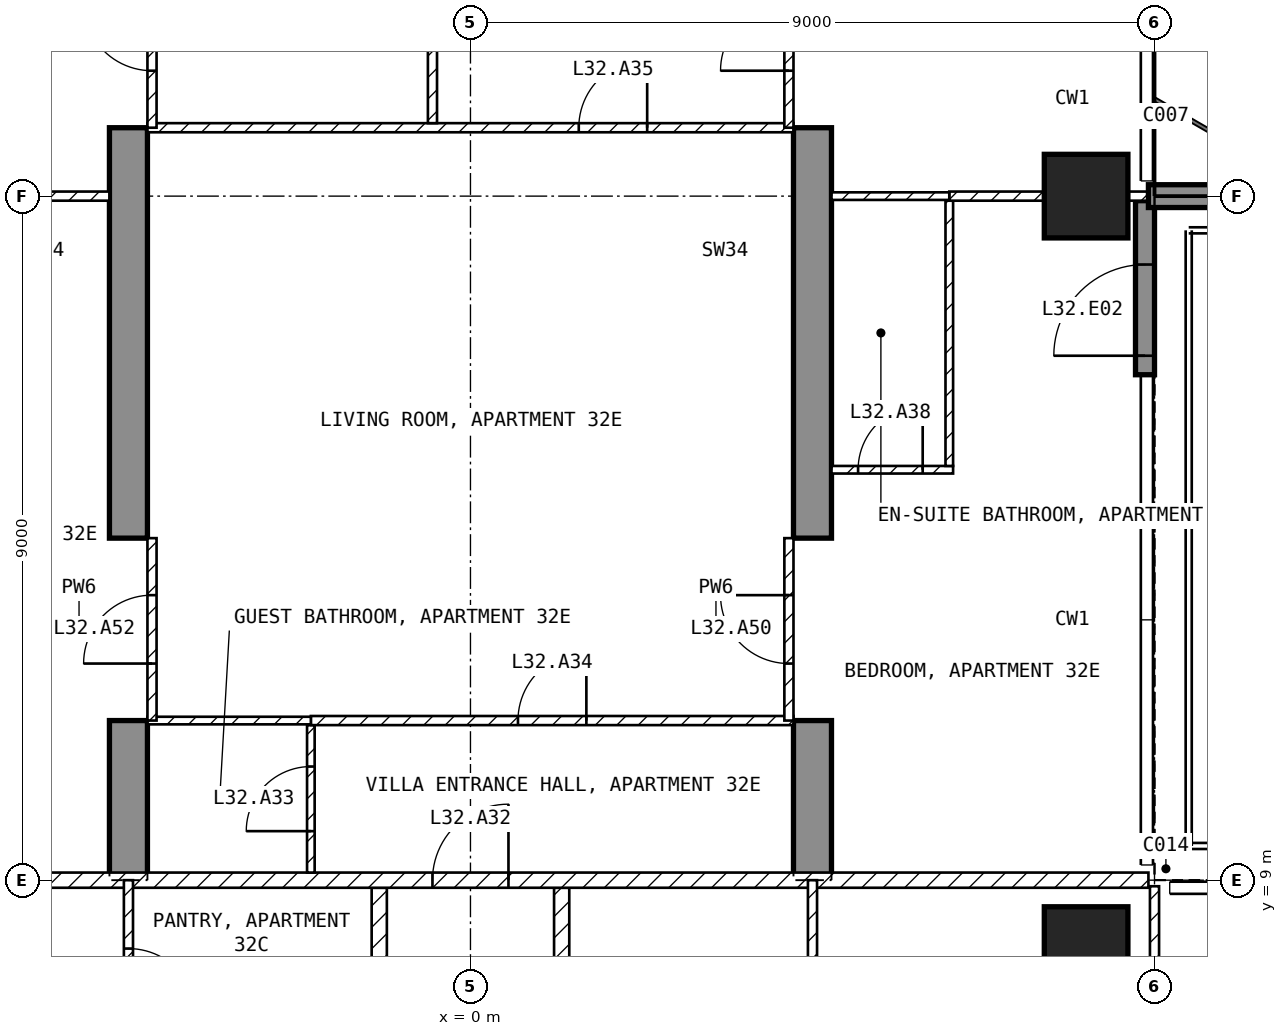
"""IFC4 building model, lengths in metres.
Left out: names, types, materials, properties, quantities, classifications, styles, units other than length and angle.
Written with IfcOpenShell. Run it as: python <this file> out.ifc"""

import sys

from ifc_helpers import new_model, si_unit, direction, frame, frame_2d, origin, origin_2d, place, context, subcontext, project, spatial, polyline, rectangle, outline, extrude, element, fill, save


model = new_model("IFC4")
c1 = context("Model", 3, precision=1e-05, world=origin(), true_north=direction((0.0, 1.0)))
c2 = subcontext(c1, "Body", "Model", "MODEL_VIEW")
j1 = project(units=[si_unit("LENGTHUNIT", "METRE"), si_unit("PLANEANGLEUNIT", "RADIAN")], contexts=[c1])
p1 = place(None, origin())
s1 = spatial("IfcSite", under=j1, at=p1, CompositionType="ELEMENT")
p2 = place(p1, origin())
s2 = spatial("IfcBuilding", under=s1, at=p2, CompositionType="ELEMENT")
p3 = place(p2, frame((0.0, 0.0, 133.9)))
s3 = spatial("IfcBuildingStorey", under=s2, at=p3, CompositionType="ELEMENT", Elevation=133.9)
for number, where, z_axis, x_axis in (
    (1, (8.1, 8.1, -0.25), (0.0, 0.0, 1.0), (1.0, 0.0, 0.0)),
    (2, (8.1, 18.0, -0.25), (0.0, 0.0, 1.0), (1.0, 0.0, 0.0)),
):
    element("IfcColumn", number, at=place(p3, frame(where, z_axis=z_axis, x_axis=x_axis)), inside=s3, PredefinedType="COLUMN", context=c2, shape_type="SweptSolid", body=[
        extrude(rectangle(XDim=1.1, YDim=1.1, at=origin_2d()), origin(), (0.0, 0.0, 1.0), 3.5),
    ])
for number, where, z_axis, x_axis in (
    (3, (-4.75, 9.0, -0.25), (1.0, 0.0, 0.0), (0.0, 1.0, 0.0)),
    (4, (4.25, 9.0, -0.25), (1.0, 0.0, 0.0), (0.0, 1.0, 0.0)),
):
    element("IfcWall", number, at=place(p3, frame(where, z_axis=z_axis, x_axis=x_axis)), inside=s3, PredefinedType="SHEAR", context=c2, shape_type="SweptSolid", body=[
        extrude(outline(polyline([(0.0, 0.0), (2.1, 0.0), (2.1, 2.65), (4.5, 2.65), (4.5, 0.0), (9.9, 0.0), (9.9, 2.65), (12.3, 2.65), (12.3, 0.0), (16.55, 0.0), (16.55, 3.5), (0.0, 3.5), (0.0, 0.0)])), origin(), (0.0, 0.0, 1.0), 0.5),
    ])
p4 = place(p3, frame((8.875, 15.65, 0.0), z_axis=(0.0, 0.0, 1.0), x_axis=(0.0, 1.0, 0.0)))
e5 = element("IfcWall", 5, at=p4, inside=s3, PredefinedType="SOLIDWALL", context=c2, shape_type="SweptSolid", body=[
    extrude(rectangle(XDim=2.29, YDim=0.25, at=frame_2d((1.145, 0.0))), origin(), (0.0, 0.0, 1.0), 3.25),
])
p5 = place(p4, frame((0.25, 0.0, 0.0)))
e6 = element("IfcOpeningElement", 6, at=p5, cuts=e5, PredefinedType="OPENING", context=c2, shape_type="SweptSolid", body=[
    extrude(rectangle(XDim=1.2, YDim=2.4, at=frame_2d((0.6, 1.2))), frame((0.0, 0.135, 0.0), z_axis=(0.0, -1.0, 0.0), x_axis=(1.0, 0.0, 0.0)), (0.0, 0.0, 1.0), 0.27),
])
p6 = place(p3, frame((8.92, 18.0, 0.0), z_axis=(0.0, 0.0, 1.0), x_axis=(1.0, 0.0, 0.0)))
e7 = element("IfcWall", 7, at=p6, inside=s3, PredefinedType="SOLIDWALL", context=c2, shape_type="SweptSolid", body=[
    extrude(rectangle(XDim=2.82, YDim=0.3, at=frame_2d((1.41, 0.0))), origin(), (0.0, 0.0, 1.0), 3.25),
])
for number, where, z_axis, x_axis in (
    (8, (1.2, 8.9, 0.0), (0.0, 0.0, 1.0), (0.0, -1.0, 0.0)),
    (9, (-1.2, 4.6, 0.0), (0.0, 0.0, 1.0), (0.0, 1.0, 0.0)),
):
    element("IfcWall", number, at=place(p3, frame(where, z_axis=z_axis, x_axis=x_axis)), inside=s3, PredefinedType="PARTITIONING", context=c2, shape_type="SweptSolid", body=[
        extrude(rectangle(XDim=4.3, YDim=0.2, at=frame_2d((2.15, 0.0))), origin(), (0.0, 0.0, 1.0), 3.25),
    ])
p7 = place(p3, frame((-8.92, 9.0, 0.0), z_axis=(0.0, 0.0, 1.0), x_axis=(1.0, 0.0, 0.0)))
e10 = element("IfcWall", 10, at=p7, inside=s3, PredefinedType="PARTITIONING", context=c2, shape_type="SweptSolid", body=[
    extrude(rectangle(XDim=17.84, YDim=0.2, at=frame_2d((8.92, 0.0))), origin(), (0.0, 0.0, 1.0), 3.25),
])
p8 = place(p7, frame((8.42, 0.0, 0.0)))
e11 = element("IfcOpeningElement", 11, at=p8, cuts=e10, PredefinedType="OPENING", context=c2, shape_type="SweptSolid", body=[
    extrude(rectangle(XDim=1.0, YDim=2.1, at=frame_2d((0.5, 1.05))), frame((0.0, 0.11, 0.0), z_axis=(0.0, -1.0, 0.0), x_axis=(1.0, 0.0, 0.0)), (0.0, 0.0, 1.0), 0.22),
])
p9 = place(p3, frame((9.0, 1.3, 0.0), z_axis=(0.0, 0.0, 1.0), x_axis=(0.0, 1.0, 0.0)))
e12 = element("IfcWall", 12, at=p9, inside=s3, PredefinedType="PARTITIONING", context=c2, shape_type="SweptSolid", body=[
    extrude(rectangle(XDim=7.62, YDim=0.12, at=frame_2d((3.81, 0.0))), origin(), (0.0, 0.0, 1.0), 3.25),
])
p10 = place(p9, frame((4.1, 0.0, 0.0)))
e13 = element("IfcOpeningElement", 13, at=p10, cuts=e12, PredefinedType="OPENING", context=c2, shape_type="SweptSolid", body=[
    extrude(rectangle(XDim=0.9, YDim=2.1, at=frame_2d((0.45, 1.05))), frame((0.0, 0.07, 0.0), z_axis=(0.0, -1.0, 0.0), x_axis=(1.0, 0.0, 0.0)), (0.0, 0.0, 1.0), 0.14),
])
p11 = place(p3, frame((4.5, 4.5, 0.0), z_axis=(0.0, 0.0, 1.0), x_axis=(0.0, 1.0, 0.0)))
e14 = element("IfcWall", 14, at=p11, inside=s3, PredefinedType="PARTITIONING", context=c2, shape_type="SweptSolid", body=[
    extrude(rectangle(XDim=4.5, YDim=0.12, at=frame_2d((2.25, 0.0))), origin(), (0.0, 0.0, 1.0), 3.25),
])
p12 = place(p11, frame((1.8, 0.0, 0.0)))
e15 = element("IfcOpeningElement", 15, at=p12, cuts=e14, PredefinedType="OPENING", context=c2, shape_type="SweptSolid", body=[
    extrude(rectangle(XDim=0.9, YDim=2.1, at=frame_2d((0.45, 1.05))), frame((0.0, 0.07, 0.0), z_axis=(0.0, -1.0, 0.0), x_axis=(1.0, 0.0, 0.0)), (0.0, 0.0, 1.0), 0.14),
])
p13 = place(p3, frame((-4.5, 9.0, 0.0), z_axis=(0.0, 0.0, 1.0), x_axis=(0.0, -1.0, 0.0)))
e16 = element("IfcWall", 16, at=p13, inside=s3, PredefinedType="PARTITIONING", context=c2, shape_type="SweptSolid", body=[
    extrude(rectangle(XDim=2.7, YDim=0.12, at=frame_2d((1.35, 0.0))), origin(), (0.0, 0.0, 1.0), 3.25),
])
p14 = place(p13, frame((0.9, 0.0, 0.0)))
e17 = element("IfcOpeningElement", 17, at=p14, cuts=e16, PredefinedType="OPENING", context=c2, shape_type="SweptSolid", body=[
    extrude(rectangle(XDim=0.9, YDim=2.1, at=frame_2d((0.45, 1.05))), frame((0.0, 0.07, 0.0), z_axis=(0.0, -1.0, 0.0), x_axis=(1.0, 0.0, 0.0)), (0.0, 0.0, 1.0), 0.14),
])
p15 = place(p3, frame((-2.1, 9.1, 0.0), z_axis=(0.0, 0.0, 1.0), x_axis=(0.0, 1.0, 0.0)))
e18 = element("IfcWall", 18, at=p15, inside=s3, PredefinedType="PARTITIONING", context=c2, shape_type="SweptSolid", body=[
    extrude(rectangle(XDim=1.94, YDim=0.1, at=frame_2d((0.97, 0.0))), origin(), (0.0, 0.0, 1.0), 3.25),
])
p16 = place(p15, frame((0.545, 0.0, 0.0)))
e19 = element("IfcOpeningElement", 19, at=p16, cuts=e18, PredefinedType="OPENING", context=c2, shape_type="SweptSolid", body=[
    extrude(rectangle(XDim=0.85, YDim=2.1, at=frame_2d((0.425, 1.05))), frame((0.0, 0.06, 0.0), z_axis=(0.0, -1.0, 0.0), x_axis=(1.0, 0.0, 0.0)), (0.0, 0.0, 1.0), 0.12),
])
p17 = place(p3, frame((-2.1, 11.1, 0.0), z_axis=(0.0, 0.0, 1.0), x_axis=(1.0, 0.0, 0.0)))
e20 = element("IfcWall", 20, at=p17, inside=s3, PredefinedType="PARTITIONING", context=c2, shape_type="SweptSolid", body=[
    extrude(rectangle(XDim=6.35, YDim=0.12, at=frame_2d((3.175, 0.0))), origin(), (0.0, 0.0, 1.0), 3.25),
])
p18 = place(p17, frame((2.725, 0.0, 0.0)))
e21 = element("IfcOpeningElement", 21, at=p18, cuts=e20, PredefinedType="OPENING", context=c2, shape_type="SweptSolid", body=[
    extrude(rectangle(XDim=0.9, YDim=2.1, at=frame_2d((0.45, 1.05))), frame((0.0, 0.07, 0.0), z_axis=(0.0, -1.0, 0.0), x_axis=(1.0, 0.0, 0.0)), (0.0, 0.0, 1.0), 0.14),
])
p19 = place(p3, frame((-4.25, 11.1, 0.0), z_axis=(0.0, 0.0, 1.0), x_axis=(1.0, 0.0, 0.0)))
e22 = element("IfcWall", 22, at=p19, inside=s3, PredefinedType="PARTITIONING", context=c2, shape_type="SweptSolid", body=[
    extrude(rectangle(XDim=2.15, YDim=0.1, at=frame_2d((1.075, 0.0))), origin(), (0.0, 0.0, 1.0), 3.25),
])
p20 = place(p3, frame((-4.25, 18.9, 0.0), z_axis=(0.0, 0.0, 1.0), x_axis=(1.0, 0.0, 0.0)))
e23 = element("IfcWall", 23, at=p20, inside=s3, PredefinedType="PARTITIONING", context=c2, shape_type="SweptSolid", body=[
    extrude(rectangle(XDim=8.5, YDim=0.12, at=frame_2d((4.25, 0.0))), origin(), (0.0, 0.0, 1.0), 3.25),
])
p21 = place(p20, frame((5.675, 0.0, 0.0)))
e24 = element("IfcOpeningElement", 24, at=p21, cuts=e23, PredefinedType="OPENING", context=c2, shape_type="SweptSolid", body=[
    extrude(rectangle(XDim=0.9, YDim=2.1, at=frame_2d((0.45, 1.05))), frame((0.0, 0.07, 0.0), z_axis=(0.0, -1.0, 0.0), x_axis=(1.0, 0.0, 0.0)), (0.0, 0.0, 1.0), 0.14),
])
p22 = place(p3, frame((-0.5, 18.96, 0.0), z_axis=(0.0, 0.0, 1.0), x_axis=(0.0, 1.0, 0.0)))
e25 = element("IfcWall", 25, at=p22, inside=s3, PredefinedType="PARTITIONING", context=c2, shape_type="SweptSolid", body=[
    extrude(rectangle(XDim=4.38, YDim=0.12, at=frame_2d((2.19, 0.0))), origin(), (0.0, 0.0, 1.0), 3.25),
])
p23 = place(p22, frame((1.74, 0.0, 0.0)))
e26 = element("IfcOpeningElement", 26, at=p23, cuts=e25, PredefinedType="OPENING", context=c2, shape_type="SweptSolid", body=[
    extrude(rectangle(XDim=0.9, YDim=2.1, at=frame_2d((0.45, 1.05))), frame((0.0, 0.07, 0.0), z_axis=(0.0, -1.0, 0.0), x_axis=(1.0, 0.0, 0.0)), (0.0, 0.0, 1.0), 0.14),
])
p24 = place(p3, frame((4.75, 14.4, 0.0), z_axis=(0.0, 0.0, 1.0), x_axis=(1.0, 0.0, 0.0)))
e27 = element("IfcWall", 27, at=p24, inside=s3, PredefinedType="PARTITIONING", context=c2, shape_type="SweptSolid", body=[
    extrude(rectangle(XDim=1.6, YDim=0.1, at=frame_2d((0.8, 0.0))), origin(), (0.0, 0.0, 1.0), 3.25),
])
p25 = place(p24, frame((0.35, 0.0, 0.0)))
e28 = element("IfcOpeningElement", 28, at=p25, cuts=e27, PredefinedType="OPENING", context=c2, shape_type="SweptSolid", body=[
    extrude(rectangle(XDim=0.85, YDim=2.1, at=frame_2d((0.425, 1.05))), frame((0.0, 0.06, 0.0), z_axis=(0.0, -1.0, 0.0), x_axis=(1.0, 0.0, 0.0)), (0.0, 0.0, 1.0), 0.12),
])
p26 = place(p3, frame((6.3, 14.45, 0.0), z_axis=(0.0, 0.0, 1.0), x_axis=(0.0, 1.0, 0.0)))
e29 = element("IfcWall", 29, at=p26, inside=s3, PredefinedType="PARTITIONING", context=c2, shape_type="SweptSolid", body=[
    extrude(rectangle(XDim=3.49, YDim=0.1, at=frame_2d((1.745, 0.0))), origin(), (0.0, 0.0, 1.0), 3.25),
])
p27 = place(p3, frame((6.3, 18.0, 0.0), z_axis=(0.0, 0.0, 1.0), x_axis=(1.0, 0.0, 0.0)))
e30 = element("IfcWall", 30, at=p27, inside=s3, PredefinedType="PARTITIONING", context=c2, shape_type="SweptSolid", body=[
    extrude(rectangle(XDim=2.62, YDim=0.12, at=frame_2d((1.31, 0.0))), origin(), (0.0, 0.0, 1.0), 2.414),
])
p28 = place(p3, frame((4.75, 18.0, 0.0), z_axis=(0.0, 0.0, 1.0), x_axis=(1.0, 0.0, 0.0)))
e31 = element("IfcWall", 31, at=p28, inside=s3, PredefinedType="PARTITIONING", context=c2, shape_type="SweptSolid", body=[
    extrude(rectangle(XDim=1.55, YDim=0.1, at=frame_2d((0.775, 0.0))), origin(), (0.0, 0.0, 1.0), 2.414),
])
p29 = place(p3, frame((-8.92, 18.0, 0.0), z_axis=(0.0, 0.0, 1.0), x_axis=(1.0, 0.0, 0.0)))
e32 = element("IfcWall", 32, at=p29, inside=s3, PredefinedType="PARTITIONING", context=c2, shape_type="SweptSolid", body=[
    extrude(rectangle(XDim=4.17, YDim=0.12, at=frame_2d((2.085, 0.0))), origin(), (0.0, 0.0, 1.0), 2.414),
])
p30 = place(p3, frame((4.19, 11.1, 0.0), z_axis=(0.0, 0.0, 1.0), x_axis=(0.0, 1.0, 0.0)))
e33 = element("IfcWall", 33, at=p30, inside=s3, PredefinedType="PARTITIONING", context=c2, shape_type="SweptSolid", body=[
    extrude(rectangle(XDim=2.4, YDim=0.12, at=frame_2d((1.2, 0.0))), origin(), (0.0, 0.0, 1.0), 2.4),
])
p31 = place(p30, frame((0.75, 0.0, 0.0)))
e34 = element("IfcOpeningElement", 34, at=p31, cuts=e33, PredefinedType="OPENING", context=c2, shape_type="SweptSolid", body=[
    extrude(rectangle(XDim=0.9, YDim=2.1, at=frame_2d((0.45, 1.05))), frame((0.0, 0.07, 0.0), z_axis=(0.0, -1.0, 0.0), x_axis=(1.0, 0.0, 0.0)), (0.0, 0.0, 1.0), 0.14),
])
p32 = place(p3, frame((4.19, 18.9, 0.0), z_axis=(0.0, 0.0, 1.0), x_axis=(0.0, 1.0, 0.0)))
e35 = element("IfcWall", 35, at=p32, inside=s3, PredefinedType="PARTITIONING", context=c2, shape_type="SweptSolid", body=[
    extrude(rectangle(XDim=2.4, YDim=0.12, at=frame_2d((1.2, 0.0))), origin(), (0.0, 0.0, 1.0), 2.4),
])
p33 = place(p32, frame((0.75, 0.0, 0.0)))
e36 = element("IfcOpeningElement", 36, at=p33, cuts=e35, PredefinedType="OPENING", context=c2, shape_type="SweptSolid", body=[
    extrude(rectangle(XDim=0.9, YDim=2.1, at=frame_2d((0.45, 1.05))), frame((0.0, 0.07, 0.0), z_axis=(0.0, -1.0, 0.0), x_axis=(1.0, 0.0, 0.0)), (0.0, 0.0, 1.0), 0.14),
])
p34 = place(p3, frame((-4.19, 11.1, 0.0), z_axis=(0.0, 0.0, 1.0), x_axis=(0.0, 1.0, 0.0)))
e37 = element("IfcWall", 37, at=p34, inside=s3, PredefinedType="PARTITIONING", context=c2, shape_type="SweptSolid", body=[
    extrude(rectangle(XDim=2.4, YDim=0.12, at=frame_2d((1.2, 0.0))), origin(), (0.0, 0.0, 1.0), 2.4),
])
p35 = place(p34, frame((0.75, 0.0, 0.0)))
e38 = element("IfcOpeningElement", 38, at=p35, cuts=e37, PredefinedType="OPENING", context=c2, shape_type="SweptSolid", body=[
    extrude(rectangle(XDim=0.9, YDim=2.1, at=frame_2d((0.45, 1.05))), frame((0.0, 0.07, 0.0), z_axis=(0.0, -1.0, 0.0), x_axis=(1.0, 0.0, 0.0)), (0.0, 0.0, 1.0), 0.14),
])
p36 = place(p3, frame((-4.19, 18.9, 0.0), z_axis=(0.0, 0.0, 1.0), x_axis=(0.0, 1.0, 0.0)))
e39 = element("IfcWall", 39, at=p36, inside=s3, PredefinedType="PARTITIONING", context=c2, shape_type="SweptSolid", body=[
    extrude(rectangle(XDim=2.4, YDim=0.12, at=frame_2d((1.2, 0.0))), origin(), (0.0, 0.0, 1.0), 2.4),
])
p37 = place(p36, frame((0.75, 0.0, 0.0)))
e40 = element("IfcOpeningElement", 40, at=p37, cuts=e39, PredefinedType="OPENING", context=c2, shape_type="SweptSolid", body=[
    extrude(rectangle(XDim=0.9, YDim=2.1, at=frame_2d((0.45, 1.05))), frame((0.0, 0.07, 0.0), z_axis=(0.0, -1.0, 0.0), x_axis=(1.0, 0.0, 0.0)), (0.0, 0.0, 1.0), 0.14),
])
p38 = place(p5, origin())
e41 = element("IfcDoor", 41, at=p38, inside=s3, OperationType="SINGLE_SWING_LEFT", PredefinedType="DOOR", context=c2, shape_type="SweptSolid", body=[
    extrude(rectangle(XDim=1.2, YDim=2.4, at=frame_2d((0.6, 1.2))), frame((0.0, 0.025, 0.0), z_axis=(0.0, -1.0, 0.0), x_axis=(1.0, 0.0, 0.0)), (0.0, 0.0, 1.0), 0.05),
])
fill(e6, e41)
p39 = place(p14, origin())
e42 = element("IfcDoor", 42, at=p39, inside=s3, OperationType="SINGLE_SWING_RIGHT", PredefinedType="DOOR", context=c2, shape_type="SweptSolid", body=[
    extrude(rectangle(XDim=0.9, YDim=2.1, at=frame_2d((0.45, 1.05))), frame((0.0, 0.025, 0.0), z_axis=(0.0, -1.0, 0.0), x_axis=(1.0, 0.0, 0.0)), (0.0, 0.0, 1.0), 0.05),
])
fill(e17, e42)
p40 = place(p8, origin())
e43 = element("IfcDoor", 43, at=p40, inside=s3, OperationType="SINGLE_SWING_RIGHT", PredefinedType="DOOR", context=c2, shape_type="SweptSolid", body=[
    extrude(rectangle(XDim=1.0, YDim=2.1, at=frame_2d((0.5, 1.05))), frame((0.0, 0.025, 0.0), z_axis=(0.0, -1.0, 0.0), x_axis=(1.0, 0.0, 0.0)), (0.0, 0.0, 1.0), 0.05),
])
fill(e11, e43)
p41 = place(p16, origin())
e44 = element("IfcDoor", 44, at=p41, inside=s3, OperationType="SINGLE_SWING_LEFT", PredefinedType="DOOR", context=c2, shape_type="SweptSolid", body=[
    extrude(rectangle(XDim=0.85, YDim=2.1, at=frame_2d((0.425, 1.05))), frame((0.0, 0.025, 0.0), z_axis=(0.0, -1.0, 0.0), x_axis=(1.0, 0.0, 0.0)), (0.0, 0.0, 1.0), 0.05),
])
fill(e19, e44)
p42 = place(p18, origin())
e45 = element("IfcDoor", 45, at=p42, inside=s3, OperationType="SINGLE_SWING_RIGHT", PredefinedType="DOOR", context=c2, shape_type="SweptSolid", body=[
    extrude(rectangle(XDim=0.9, YDim=2.1, at=frame_2d((0.45, 1.05))), frame((0.0, 0.025, 0.0), z_axis=(0.0, -1.0, 0.0), x_axis=(1.0, 0.0, 0.0)), (0.0, 0.0, 1.0), 0.05),
])
fill(e21, e45)
p43 = place(p21, origin())
e46 = element("IfcDoor", 46, at=p43, inside=s3, OperationType="SINGLE_SWING_RIGHT", PredefinedType="DOOR", context=c2, shape_type="SweptSolid", body=[
    extrude(rectangle(XDim=0.9, YDim=2.1, at=frame_2d((0.45, 1.05))), frame((0.0, 0.025, 0.0), z_axis=(0.0, -1.0, 0.0), x_axis=(1.0, 0.0, 0.0)), (0.0, 0.0, 1.0), 0.05),
])
fill(e24, e46)
p44 = place(p25, origin())
e47 = element("IfcDoor", 47, at=p44, inside=s3, OperationType="SINGLE_SWING_RIGHT", PredefinedType="DOOR", context=c2, shape_type="SweptSolid", body=[
    extrude(rectangle(XDim=0.85, YDim=2.1, at=frame_2d((0.425, 1.05))), frame((0.0, 0.025, 0.0), z_axis=(0.0, -1.0, 0.0), x_axis=(1.0, 0.0, 0.0)), (0.0, 0.0, 1.0), 0.05),
])
fill(e28, e47)
p45 = place(p31, origin())
e48 = element("IfcDoor", 48, at=p45, inside=s3, OperationType="SINGLE_SWING_RIGHT", PredefinedType="DOOR", context=c2, shape_type="SweptSolid", body=[
    extrude(rectangle(XDim=0.9, YDim=2.1, at=frame_2d((0.45, 1.05))), frame((0.0, 0.025, 0.0), z_axis=(0.0, -1.0, 0.0), x_axis=(1.0, 0.0, 0.0)), (0.0, 0.0, 1.0), 0.05),
])
fill(e34, e48)
p46 = place(p33, origin())
e49 = element("IfcDoor", 49, at=p46, inside=s3, OperationType="SINGLE_SWING_LEFT", PredefinedType="DOOR", context=c2, shape_type="SweptSolid", body=[
    extrude(rectangle(XDim=0.9, YDim=2.1, at=frame_2d((0.45, 1.05))), frame((0.0, 0.025, 0.0), z_axis=(0.0, -1.0, 0.0), x_axis=(1.0, 0.0, 0.0)), (0.0, 0.0, 1.0), 0.05),
])
fill(e36, e49)
p47 = place(p35, origin())
e50 = element("IfcDoor", 50, at=p47, inside=s3, OperationType="SINGLE_SWING_LEFT", PredefinedType="DOOR", context=c2, shape_type="SweptSolid", body=[
    extrude(rectangle(XDim=0.9, YDim=2.1, at=frame_2d((0.45, 1.05))), frame((0.0, 0.025, 0.0), z_axis=(0.0, -1.0, 0.0), x_axis=(1.0, 0.0, 0.0)), (0.0, 0.0, 1.0), 0.05),
])
fill(e38, e50)
p48 = place(p37, origin())
e51 = element("IfcDoor", 51, at=p48, inside=s3, OperationType="SINGLE_SWING_RIGHT", PredefinedType="DOOR", context=c2, shape_type="SweptSolid", body=[
    extrude(rectangle(XDim=0.9, YDim=2.1, at=frame_2d((0.45, 1.05))), frame((0.0, 0.025, 0.0), z_axis=(0.0, -1.0, 0.0), x_axis=(1.0, 0.0, 0.0)), (0.0, 0.0, 1.0), 0.05),
])
fill(e40, e51)
save(model, sys.argv[1])
